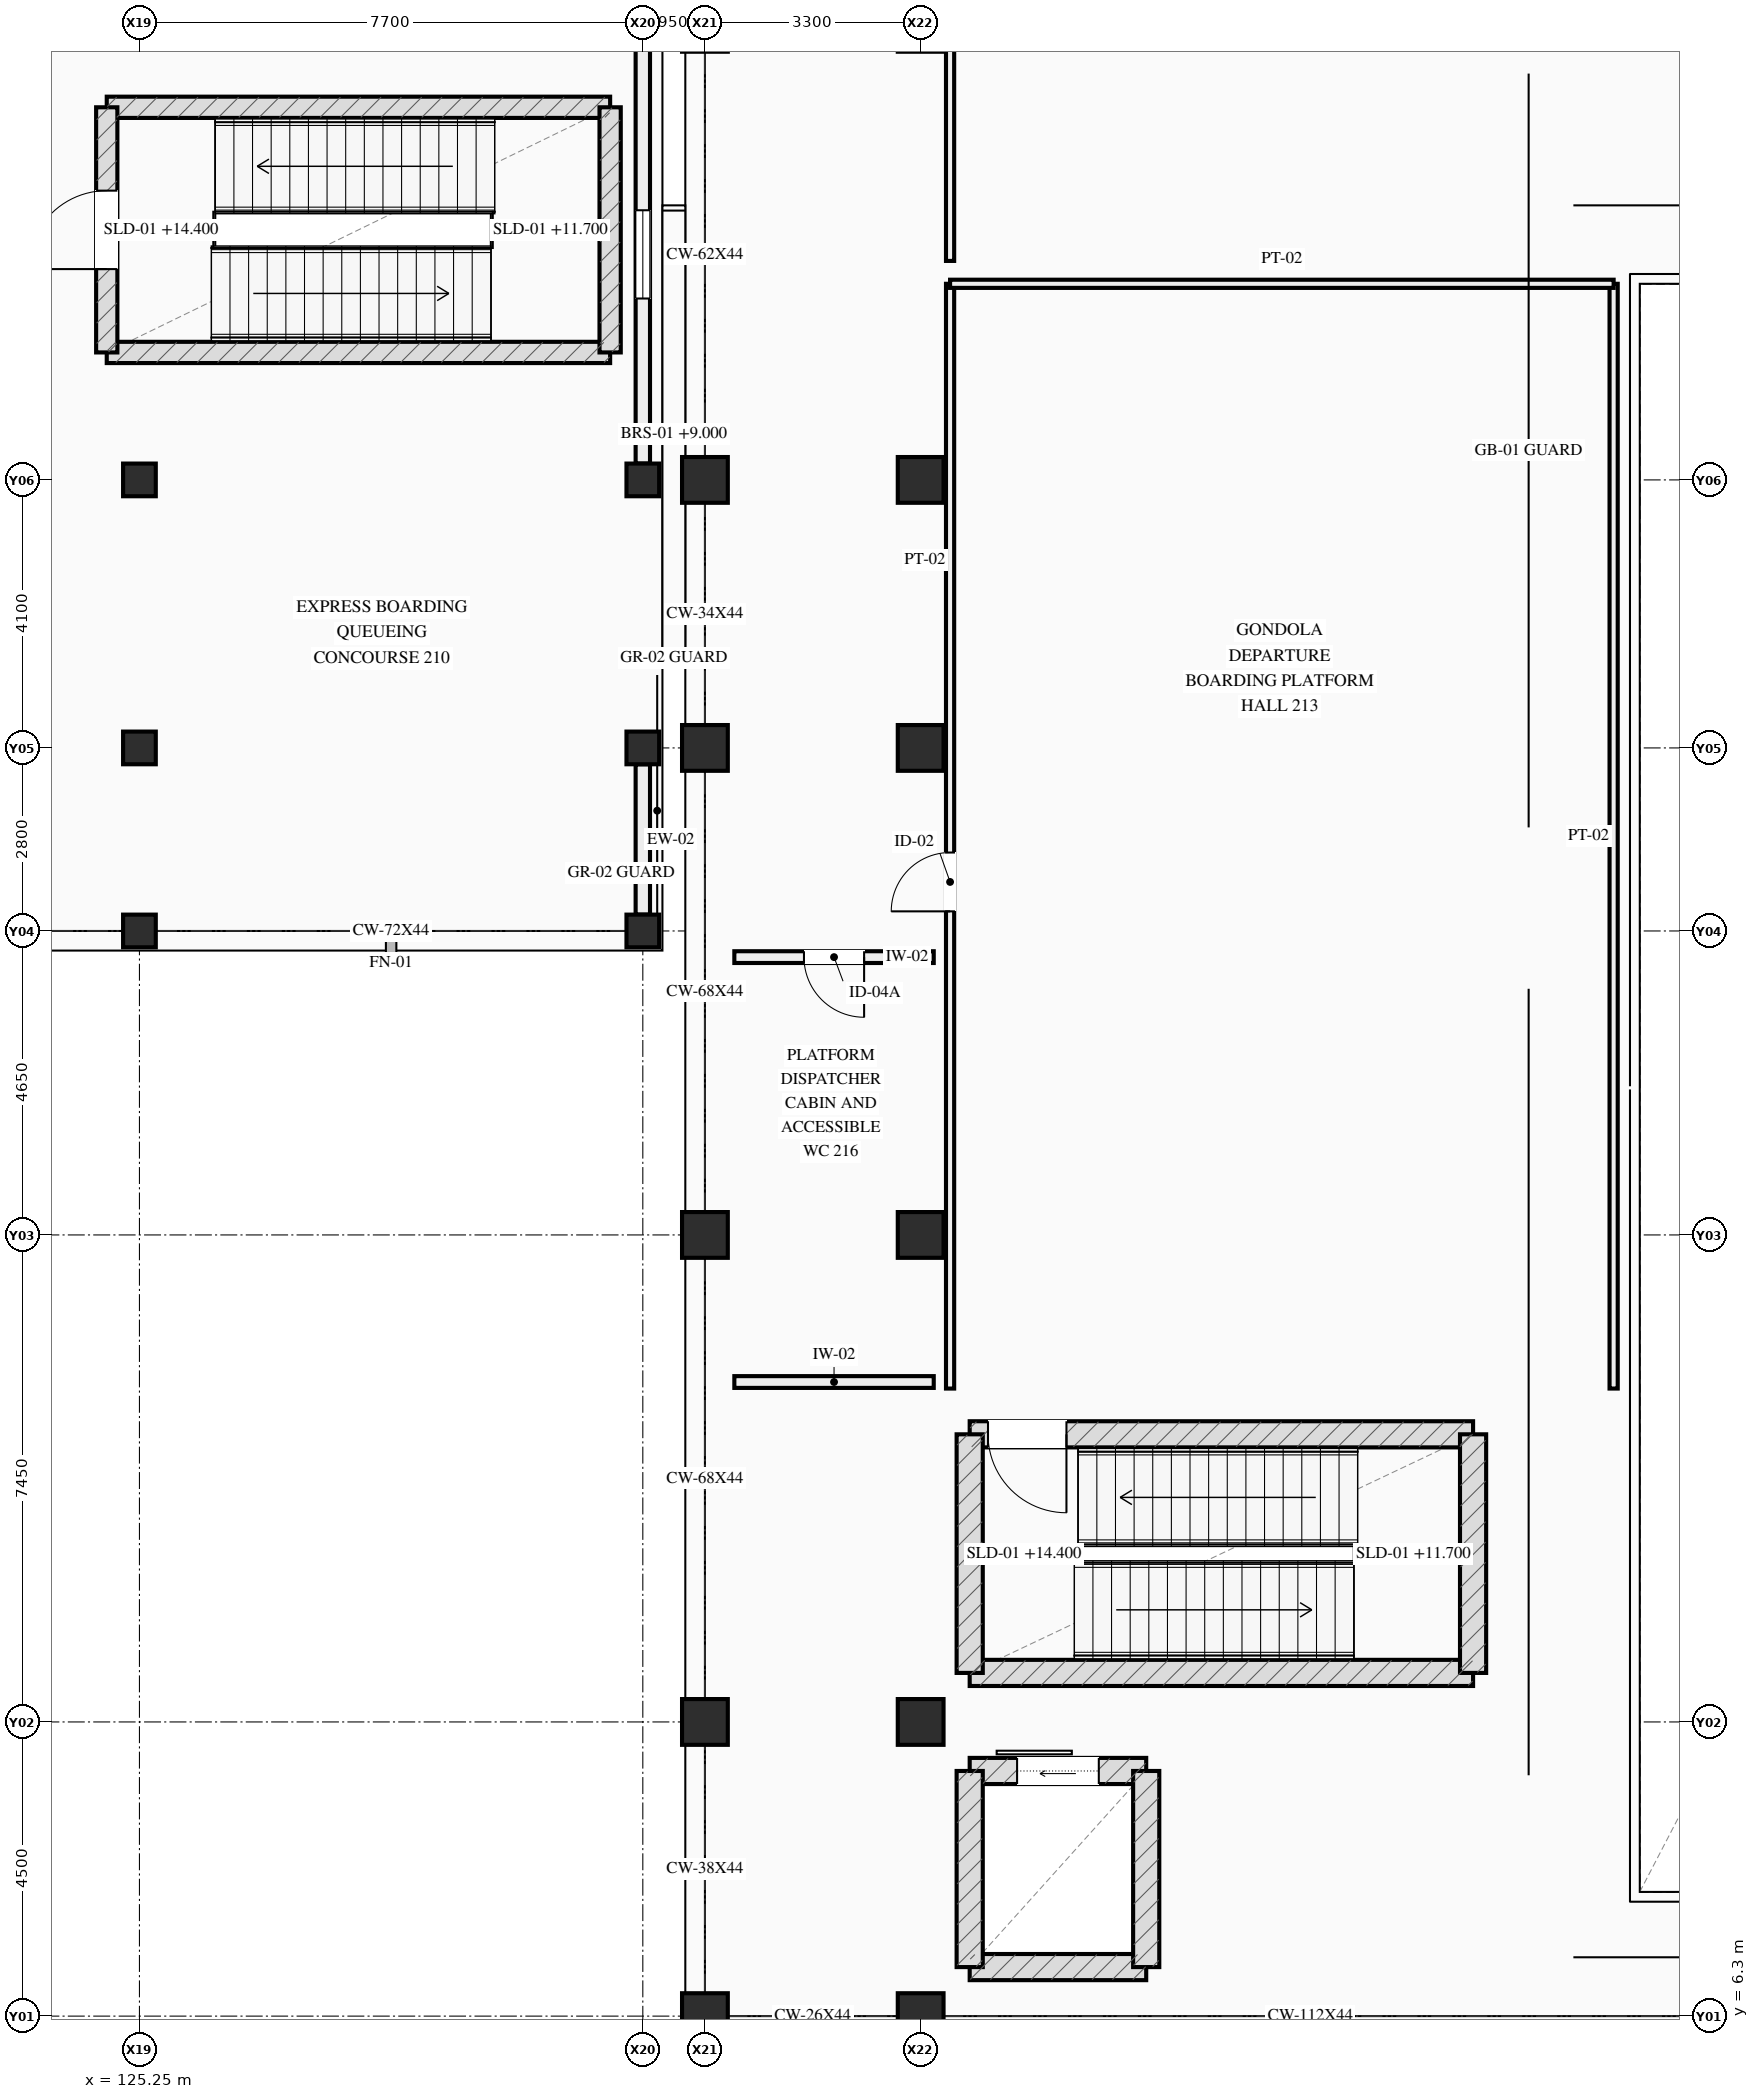
"""IFC4 building model, lengths in metres.
Left out: names, types, materials, properties, quantities, classifications, styles, units other than length and angle.
Written with IfcOpenShell. Run it as: python <this file> out.ifc"""

import sys

from ifc_helpers import new_model, si_unit, direction, frame, frame_2d, origin, origin_2d, place, context, subcontext, project, spatial, rectangle, extrude, element, fill, save


model = new_model("IFC4")
c1 = context("Model", 3, precision=1e-05, world=origin(), true_north=direction((0.0, 1.0)))
c2 = subcontext(c1, "Body", "Model", "MODEL_VIEW")
j1 = project(units=[si_unit("LENGTHUNIT", "METRE"), si_unit("PLANEANGLEUNIT", "RADIAN")], contexts=[c1])
p1 = place(None, origin())
s1 = spatial("IfcSite", under=j1, at=p1, CompositionType="ELEMENT")
p2 = place(p1, origin())
s2 = spatial("IfcBuilding", under=s1, at=p2, CompositionType="ELEMENT")
p3 = place(p2, frame((0.0, 0.0, 9.0)))
s3 = spatial("IfcBuildingStorey", under=s2, at=p3, CompositionType="ELEMENT", Elevation=9.0)
for number, where, z_axis, x_axis in (
    (1, (125.25, 22.9, 0.0), (0.0, 0.0, 1.0), (1.0, 0.0, 0.0)),
    (2, (125.25, 25.7, 0.0), (0.0, 0.0, 1.0), (1.0, 0.0, 0.0)),
    (3, (125.25, 29.8, 0.0), (0.0, 0.0, 1.0), (1.0, 0.0, 0.0)),
    (4, (132.95, 22.9, 0.0), (0.0, 0.0, 1.0), (1.0, 0.0, 0.0)),
    (5, (132.95, 25.7, 0.0), (0.0, 0.0, 1.0), (1.0, 0.0, 0.0)),
    (6, (132.95, 29.8, 0.0), (0.0, 0.0, 1.0), (1.0, 0.0, 0.0)),
):
    element("IfcColumn", number, at=place(p3, frame(where, z_axis=z_axis, x_axis=x_axis)), inside=s3, PredefinedType="COLUMN", context=c2, shape_type="SweptSolid", body=[
        extrude(rectangle(XDim=0.5, YDim=0.5, at=origin_2d()), origin(), (0.0, 0.0, 1.0), 5.4),
    ])
for number, where, z_axis, x_axis in (
    (7, (133.9, 6.3, 0.0), (0.0, 0.0, 1.0), (1.0, 0.0, 0.0)),
    (8, (133.9, 10.8, 0.0), (0.0, 0.0, 1.0), (1.0, 0.0, 0.0)),
    (9, (133.9, 18.25, 0.0), (0.0, 0.0, 1.0), (1.0, 0.0, 0.0)),
    (10, (133.9, 25.7, 0.0), (0.0, 0.0, 1.0), (1.0, 0.0, 0.0)),
    (11, (133.9, 29.8, 0.0), (0.0, 0.0, 1.0), (1.0, 0.0, 0.0)),
    (12, (137.2, 6.3, 0.0), (0.0, 0.0, 1.0), (1.0, 0.0, 0.0)),
    (13, (137.2, 10.8, 0.0), (0.0, 0.0, 1.0), (1.0, 0.0, 0.0)),
    (14, (137.2, 18.25, 0.0), (0.0, 0.0, 1.0), (1.0, 0.0, 0.0)),
    (15, (137.2, 25.7, 0.0), (0.0, 0.0, 1.0), (1.0, 0.0, 0.0)),
    (16, (137.2, 29.8, 0.0), (0.0, 0.0, 1.0), (1.0, 0.0, 0.0)),
):
    element("IfcColumn", number, at=place(p3, frame(where, z_axis=z_axis, x_axis=x_axis)), inside=s3, PredefinedType="COLUMN", context=c2, shape_type="SweptSolid", body=[
        extrude(rectangle(XDim=0.7, YDim=0.7, at=origin_2d()), origin(), (0.0, 0.0, 1.0), 5.4),
    ])
p4 = place(p3, frame((132.95, 36.45, 0.0), z_axis=(0.0, 0.0, 1.0), x_axis=(0.0, -1.0, 0.0)))
e17 = element("IfcWall", 17, at=p4, inside=s3, PredefinedType="STANDARD", context=c2, shape_type="SweptSolid", body=[
    extrude(rectangle(XDim=6.4, YDim=0.22, at=frame_2d((3.2, 0.0))), origin(), (0.0, 0.0, 1.0), 4.14),
])
p5 = place(p4, frame((2.525, 0.0, 0.98)))
e18 = element("IfcOpeningElement", 18, at=p5, cuts=e17, PredefinedType="OPENING", context=c2, shape_type="SweptSolid", body=[
    extrude(rectangle(XDim=1.35, YDim=1.35, at=frame_2d((0.675, 0.675))), frame((0.0, 0.12, 0.0), z_axis=(0.0, -1.0, 0.0), x_axis=(1.0, 0.0, 0.0)), (0.0, 0.0, 1.0), 0.24),
])
p6 = place(p3, frame((132.95, 25.45, 0.0), z_axis=(0.0, 0.0, 1.0), x_axis=(0.0, -1.0, 0.0)))
e19 = element("IfcWall", 19, at=p6, inside=s3, PredefinedType="STANDARD", context=c2, shape_type="SweptSolid", body=[
    extrude(rectangle(XDim=2.3, YDim=0.22, at=frame_2d((1.15, 0.0))), origin(), (0.0, 0.0, 1.0), 4.48),
])
for number, where, z_axis, x_axis in (
    (20, (124.75, 31.75, 0.0), (0.0, 0.0, 1.0), (1.0, 0.0, 0.0)),
    (21, (132.45, 35.5, 0.0), (0.0, 0.0, 1.0), (-1.0, 0.0, 0.0)),
):
    element("IfcWall", number, at=place(p3, frame(where, z_axis=z_axis, x_axis=x_axis)), inside=s3, PredefinedType="SHEAR", context=c2, shape_type="SweptSolid", body=[
        extrude(rectangle(XDim=7.7, YDim=0.325, at=frame_2d((3.85, 0.0))), origin(), (0.0, 0.0, 1.0), 5.175),
    ])
p7 = place(p3, frame((124.75, 35.5, 0.0), z_axis=(0.0, 0.0, 1.0), x_axis=(0.0, -1.0, 0.0)))
e22 = element("IfcWall", 22, at=p7, inside=s3, PredefinedType="SHEAR", context=c2, shape_type="SweptSolid", body=[
    extrude(rectangle(XDim=3.75, YDim=0.325, at=frame_2d((1.875, 0.0))), origin(), (0.0, 0.0, 1.0), 5.175),
])
p8 = place(p7, frame((1.275, 0.0, 0.0)))
e23 = element("IfcOpeningElement", 23, at=p8, cuts=e22, PredefinedType="OPENING", context=c2, shape_type="SweptSolid", body=[
    extrude(rectangle(XDim=1.2, YDim=2.2, at=frame_2d((0.6, 1.1))), frame((0.0, 0.172, 0.0), z_axis=(0.0, -1.0, 0.0), x_axis=(1.0, 0.0, 0.0)), (0.0, 0.0, 1.0), 0.345),
])
p9 = place(p3, frame((132.45, 31.75, 0.0), z_axis=(0.0, 0.0, 1.0), x_axis=(0.0, 1.0, 0.0)))
e24 = element("IfcWall", 24, at=p9, inside=s3, PredefinedType="SHEAR", context=c2, shape_type="SweptSolid", body=[
    extrude(rectangle(XDim=3.75, YDim=0.325, at=frame_2d((1.875, 0.0))), origin(), (0.0, 0.0, 1.0), 5.175),
])
p10 = place(p3, frame((137.95, 11.55, 0.0), z_axis=(0.0, 0.0, 1.0), x_axis=(1.0, 0.0, 0.0)))
e25 = element("IfcWall", 25, at=p10, inside=s3, PredefinedType="SHEAR", context=c2, shape_type="SweptSolid", body=[
    extrude(rectangle(XDim=7.7, YDim=0.4, at=frame_2d((3.85, 0.0))), origin(), (0.0, 0.0, 1.0), 5.175),
])
p11 = place(p3, frame((145.65, 15.2, 0.0), z_axis=(0.0, 0.0, 1.0), x_axis=(-1.0, 0.0, 0.0)))
e26 = element("IfcWall", 26, at=p11, inside=s3, PredefinedType="SHEAR", context=c2, shape_type="SweptSolid", body=[
    extrude(rectangle(XDim=7.7, YDim=0.4, at=frame_2d((3.85, 0.0))), origin(), (0.0, 0.0, 1.0), 5.175),
])
p12 = place(p11, frame((6.22, 0.0, 0.0)))
e27 = element("IfcOpeningElement", 27, at=p12, cuts=e26, PredefinedType="OPENING", context=c2, shape_type="SweptSolid", body=[
    extrude(rectangle(XDim=1.2, YDim=2.2, at=frame_2d((0.6, 1.1))), frame((0.0, 0.21, 0.0), z_axis=(0.0, -1.0, 0.0), x_axis=(1.0, 0.0, 0.0)), (0.0, 0.0, 1.0), 0.42),
])
for number, where, z_axis, x_axis in (
    (28, (137.95, 15.2, 0.0), (0.0, 0.0, 1.0), (0.0, -1.0, 0.0)),
    (29, (145.65, 11.55, 0.0), (0.0, 0.0, 1.0), (0.0, 1.0, 0.0)),
):
    element("IfcWall", number, at=place(p3, frame(where, z_axis=z_axis, x_axis=x_axis)), inside=s3, PredefinedType="SHEAR", context=c2, shape_type="SweptSolid", body=[
        extrude(rectangle(XDim=3.65, YDim=0.4, at=frame_2d((1.825, 0.0))), origin(), (0.0, 0.0, 1.0), 5.175),
    ])
p13 = place(p3, frame((137.95, 7.05, 0.0), z_axis=(0.0, 0.0, 1.0), x_axis=(1.0, 0.0, 0.0)))
e30 = element("IfcWall", 30, at=p13, inside=s3, PredefinedType="SHEAR", context=c2, shape_type="SweptSolid", body=[
    extrude(rectangle(XDim=2.7, YDim=0.4, at=frame_2d((1.35, 0.0))), origin(), (0.0, 0.0, 1.0), 5.175),
])
p14 = place(p3, frame((137.95, 10.05, 0.0), z_axis=(0.0, 0.0, 1.0), x_axis=(1.0, 0.0, 0.0)))
e31 = element("IfcWall", 31, at=p14, inside=s3, PredefinedType="SHEAR", context=c2, shape_type="SweptSolid", body=[
    extrude(rectangle(XDim=2.7, YDim=0.4, at=frame_2d((1.35, 0.0))), origin(), (0.0, 0.0, 1.0), 5.175),
])
p15 = place(p14, frame((0.725, 0.0, 0.0)))
e32 = element("IfcOpeningElement", 32, at=p15, cuts=e31, PredefinedType="OPENING", context=c2, shape_type="SweptSolid", body=[
    extrude(rectangle(XDim=1.25, YDim=2.2, at=frame_2d((0.625, 1.1))), frame((0.0, 0.21, 0.0), z_axis=(0.0, -1.0, 0.0), x_axis=(1.0, 0.0, 0.0)), (0.0, 0.0, 1.0), 0.42),
])
for number, where, z_axis, x_axis in (
    (33, (137.95, 7.05, 0.0), (0.0, 0.0, 1.0), (0.0, 1.0, 0.0)),
    (34, (140.65, 7.05, 0.0), (0.0, 0.0, 1.0), (0.0, 1.0, 0.0)),
):
    element("IfcWall", number, at=place(p3, frame(where, z_axis=z_axis, x_axis=x_axis)), inside=s3, PredefinedType="SHEAR", context=c2, shape_type="SweptSolid", body=[
        extrude(rectangle(XDim=3.0, YDim=0.4, at=frame_2d((1.5, 0.0))), origin(), (0.0, 0.0, 1.0), 5.175),
    ])
p16 = place(p3, frame((137.65, 15.9, 0.0), z_axis=(0.0, 0.0, 1.0), x_axis=(0.0, 1.0, 0.0)))
e35 = element("IfcWall", 35, at=p16, inside=s3, PredefinedType="PARTITIONING", context=c2, shape_type="SweptSolid", body=[
    extrude(rectangle(XDim=16.9, YDim=0.125, at=frame_2d((8.45, 0.0))), origin(), (0.0, 0.0, 1.0), 3.3),
])
p17 = place(p16, frame((7.3, 0.0, 0.0)))
e36 = element("IfcOpeningElement", 36, at=p17, cuts=e35, PredefinedType="OPENING", context=c2, shape_type="SweptSolid", body=[
    extrude(rectangle(XDim=0.9, YDim=2.15, at=frame_2d((0.45, 1.075))), frame((0.0, 0.073, 0.0), z_axis=(0.0, -1.0, 0.0), x_axis=(1.0, 0.0, 0.0)), (0.0, 0.0, 1.0), 0.145),
])
p18 = place(p3, frame((147.8, 15.9, 0.0), z_axis=(0.0, 0.0, 1.0), x_axis=(0.0, 1.0, 0.0)))
e37 = element("IfcWall", 37, at=p18, inside=s3, PredefinedType="PARTITIONING", context=c2, shape_type="SweptSolid", body=[
    extrude(rectangle(XDim=16.9, YDim=0.125, at=frame_2d((8.45, 0.0))), origin(), (0.0, 0.0, 1.0), 3.3),
])
p19 = place(p3, frame((137.65, 32.8, 0.0), z_axis=(0.0, 0.0, 1.0), x_axis=(1.0, 0.0, 0.0)))
e38 = element("IfcWall", 38, at=p19, inside=s3, PredefinedType="PARTITIONING", context=c2, shape_type="SweptSolid", body=[
    extrude(rectangle(XDim=10.15, YDim=0.125, at=frame_2d((5.075, 0.0))), origin(), (0.0, 0.0, 1.0), 3.3),
])
p20 = place(p3, frame((137.65, 33.15, 0.0), z_axis=(0.0, 0.0, 1.0), x_axis=(0.0, 1.0, 0.0)))
e39 = element("IfcWall", 39, at=p20, inside=s3, PredefinedType="PARTITIONING", context=c2, shape_type="SweptSolid", body=[
    extrude(rectangle(XDim=14.05, YDim=0.125, at=frame_2d((7.025, 0.0))), origin(), (0.0, 0.0, 1.0), 3.3),
])
p21 = place(p20, frame((5.875, 0.0, 0.0)))
e40 = element("IfcOpeningElement", 40, at=p21, cuts=e39, PredefinedType="OPENING", context=c2, shape_type="SweptSolid", body=[
    extrude(rectangle(XDim=1.6, YDim=2.2, at=frame_2d((0.8, 1.1))), frame((0.0, 0.073, 0.0), z_axis=(0.0, -1.0, 0.0), x_axis=(1.0, 0.0, 0.0)), (0.0, 0.0, 1.0), 0.145),
])
p22 = place(p3, frame((134.35, 22.5, 0.0), z_axis=(0.0, 0.0, 1.0), x_axis=(1.0, 0.0, 0.0)))
e41 = element("IfcWall", 41, at=p22, inside=s3, PredefinedType="PLUMBINGWALL", context=c2, shape_type="SweptSolid", body=[
    extrude(rectangle(XDim=3.05, YDim=0.18, at=frame_2d((1.525, 0.0))), origin(), (0.0, 0.0, 1.0), 3.3),
])
p23 = place(p22, frame((1.065, 0.0, 0.0)))
e42 = element("IfcOpeningElement", 42, at=p23, cuts=e41, PredefinedType="OPENING", context=c2, shape_type="SweptSolid", body=[
    extrude(rectangle(XDim=0.92, YDim=2.1, at=frame_2d((0.46, 1.05))), frame((0.0, 0.1, 0.0), z_axis=(0.0, -1.0, 0.0), x_axis=(1.0, 0.0, 0.0)), (0.0, 0.0, 1.0), 0.2),
])
p24 = place(p3, frame((134.35, 16.0, 0.0), z_axis=(0.0, 0.0, 1.0), x_axis=(1.0, 0.0, 0.0)))
e43 = element("IfcWall", 43, at=p24, inside=s3, PredefinedType="PLUMBINGWALL", context=c2, shape_type="SweptSolid", body=[
    extrude(rectangle(XDim=3.05, YDim=0.18, at=frame_2d((1.525, 0.0))), origin(), (0.0, 0.0, 1.0), 3.3),
])
p25 = place(p5, origin())
e44 = element("IfcWindow", 44, at=p25, inside=s3, PartitioningType="SINGLE_PANEL", PredefinedType="WINDOW", context=c2, shape_type="SweptSolid", body=[
    extrude(rectangle(XDim=1.35, YDim=1.35, at=frame_2d((0.675, 0.675))), frame((0.0, 0.03, 0.0), z_axis=(0.0, -1.0, 0.0), x_axis=(1.0, 0.0, 0.0)), (0.0, 0.0, 1.0), 0.06),
])
fill(e18, e44)
p26 = place(p8, origin())
e45 = element("IfcDoor", 45, at=p26, inside=s3, OperationType="SINGLE_SWING_RIGHT", PredefinedType="DOOR", context=c2, shape_type="SweptSolid", body=[
    extrude(rectangle(XDim=1.2, YDim=2.2, at=frame_2d((0.6, 1.1))), frame((0.0, 0.025, 0.0), z_axis=(0.0, -1.0, 0.0), x_axis=(1.0, 0.0, 0.0)), (0.0, 0.0, 1.0), 0.05),
])
fill(e23, e45)
p27 = place(p12, origin())
e46 = element("IfcDoor", 46, at=p27, inside=s3, OperationType="SINGLE_SWING_LEFT", PredefinedType="DOOR", context=c2, shape_type="SweptSolid", body=[
    extrude(rectangle(XDim=1.2, YDim=2.2, at=frame_2d((0.6, 1.1))), frame((0.0, 0.025, 0.0), z_axis=(0.0, -1.0, 0.0), x_axis=(1.0, 0.0, 0.0)), (0.0, 0.0, 1.0), 0.05),
])
fill(e27, e46)
p28 = place(p15, origin())
e47 = element("IfcDoor", 47, at=p28, inside=s3, OperationType="SLIDING_TO_LEFT", PredefinedType="DOOR", context=c2, shape_type="SweptSolid", body=[
    extrude(rectangle(XDim=1.25, YDim=2.2, at=frame_2d((0.625, 1.1))), frame((0.0, 0.025, 0.0), z_axis=(0.0, -1.0, 0.0), x_axis=(1.0, 0.0, 0.0)), (0.0, 0.0, 1.0), 0.05),
])
fill(e32, e47)
p29 = place(p17, origin())
e48 = element("IfcDoor", 48, at=p29, inside=s3, OperationType="SINGLE_SWING_LEFT", PredefinedType="DOOR", context=c2, shape_type="SweptSolid", body=[
    extrude(rectangle(XDim=0.9, YDim=2.15, at=frame_2d((0.45, 1.075))), frame((0.0, 0.025, 0.0), z_axis=(0.0, -1.0, 0.0), x_axis=(1.0, 0.0, 0.0)), (0.0, 0.0, 1.0), 0.05),
])
fill(e36, e48)
p30 = place(p23, origin())
e49 = element("IfcDoor", 49, at=p30, inside=s3, OperationType="SINGLE_SWING_RIGHT", PredefinedType="DOOR", context=c2, shape_type="SweptSolid", body=[
    extrude(rectangle(XDim=0.92, YDim=2.1, at=frame_2d((0.46, 1.05))), frame((0.0, 0.025, 0.0), z_axis=(0.0, -1.0, 0.0), x_axis=(1.0, 0.0, 0.0)), (0.0, 0.0, 1.0), 0.05),
])
fill(e42, e49)
save(model, sys.argv[1])
